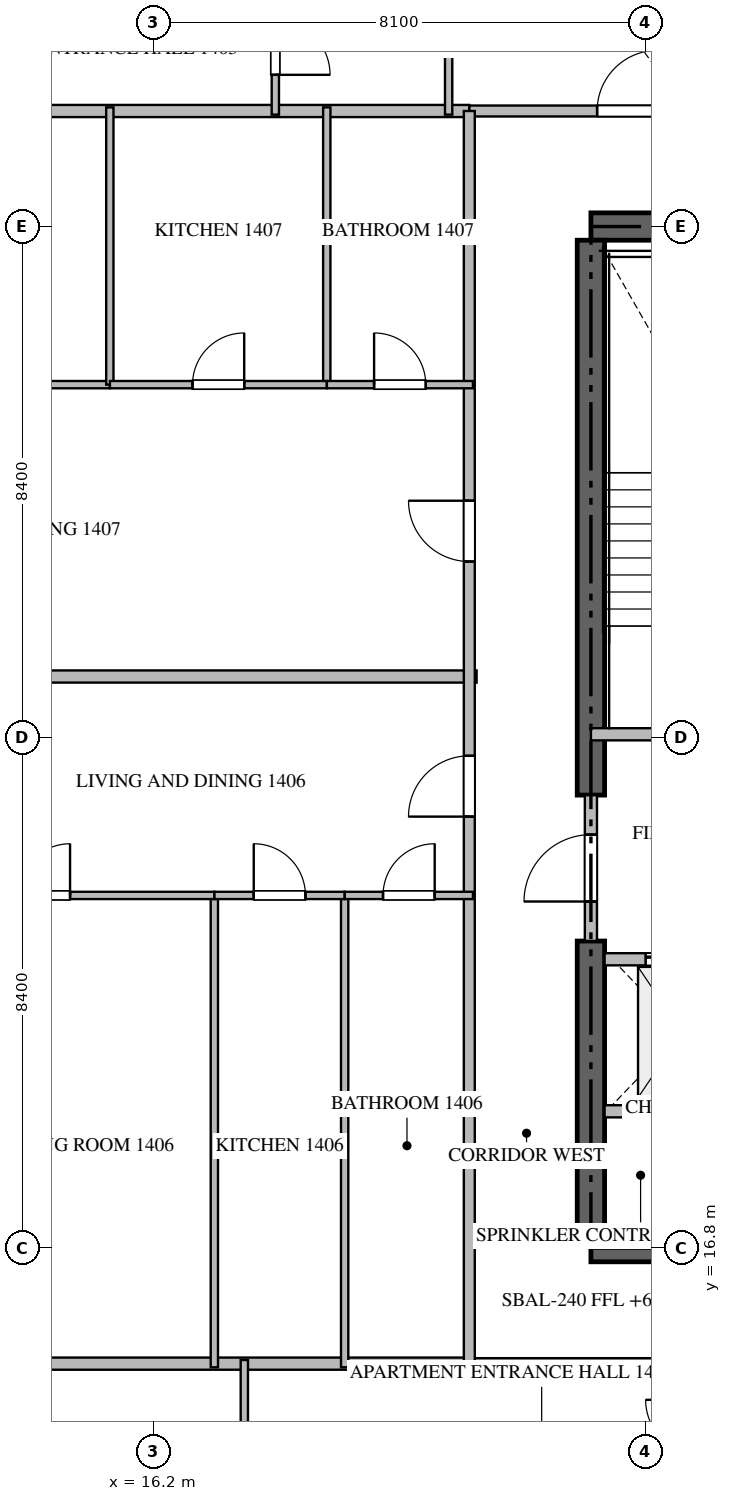
"""IFC4 building model, lengths in metres.
Left out: names, types, materials, properties, quantities, classifications, styles, units other than length and angle.
Written with IfcOpenShell. Run it as: python <this file> out.ifc"""

import sys

from ifc_helpers import new_model, si_unit, direction, frame, frame_2d, origin, place, context, subcontext, project, spatial, rectangle, extrude, source, transform, mapped, element, fill, save


model = new_model("IFC4")
c1 = context("Model", 3, precision=1e-05, world=origin(), true_north=direction((0.0, 1.0)))
c2 = subcontext(c1, "Body", "Model", "MODEL_VIEW")
j1 = project(units=[si_unit("LENGTHUNIT", "METRE"), si_unit("PLANEANGLEUNIT", "RADIAN")], contexts=[c1])
p1 = place(None, origin())
s1 = spatial("IfcSite", under=j1, at=p1, CompositionType="ELEMENT")
p2 = place(p1, origin())
s2 = spatial("IfcBuilding", under=s1, at=p2, CompositionType="ELEMENT")
p3 = place(p2, frame((0.0, 0.0, 60.45)))
s3 = spatial("IfcBuildingStorey", under=s2, at=p3, CompositionType="ELEMENT", Elevation=60.45)
for number, where, z_axis, x_axis in (
    (1, (23.4, 16.8, -0.26), (0.0, 0.0, 1.0), (1.0, 0.0, 0.0)),
    (2, (41.4, 33.6, -0.26), (0.0, 0.0, 1.0), (-1.0, 0.0, 0.0)),
):
    element("IfcWall", number, at=place(p3, frame(where, z_axis=z_axis, x_axis=x_axis)), inside=s3, PredefinedType="SHEAR", context=c2, shape_type="SweptSolid", body=[
        extrude(rectangle(XDim=18.0, YDim=0.45, at=frame_2d((9.0, 0.0))), origin(), (0.0, 0.0, 1.0), 3.748),
    ])
p4 = place(p3, frame((23.4, 17.025, -0.26), z_axis=(0.0, 0.0, 1.0), x_axis=(0.0, 1.0, 0.0)))
e3 = element("IfcWall", 3, at=p4, inside=s3, PredefinedType="SHEAR", context=c2, shape_type="SweptSolid", body=[
    extrude(rectangle(XDim=4.825, YDim=0.45, at=frame_2d((2.413, 0.0))), origin(), (0.0, 0.0, 1.0), 3.748),
])
p5 = place(p3, frame((23.4, 24.25, -0.26), z_axis=(0.0, 0.0, 1.0), x_axis=(0.0, 1.0, 0.0)))
e4 = element("IfcWall", 4, at=p5, inside=s3, PredefinedType="SHEAR", context=c2, shape_type="SweptSolid", body=[
    extrude(rectangle(XDim=9.125, YDim=0.45, at=frame_2d((4.562, 0.0))), origin(), (0.0, 0.0, 1.0), 3.748),
])
p6 = place(p3, frame((23.4, 25.25, 0.0), z_axis=(0.0, 0.0, 1.0), x_axis=(1.0, 0.0, 0.0)))
e5 = element("IfcWall", 5, at=p6, inside=s3, PredefinedType="STANDARD", context=c2, shape_type="SweptSolid", body=[
    extrude(rectangle(XDim=4.45, YDim=0.2, at=frame_2d((2.225, 0.0))), origin(), (0.0, 0.0, 1.0), 3.49),
])
p7 = place(p6, frame((1.65, 0.0, 0.0)))
e6 = element("IfcOpeningElement", 6, at=p7, cuts=e5, PredefinedType="OPENING", context=c2, shape_type="SweptSolid", body=[
    extrude(rectangle(XDim=1.1, YDim=2.15, at=frame_2d((0.55, 1.075))), frame((0.0, 0.11, 0.0), z_axis=(0.0, -1.0, 0.0), x_axis=(1.0, 0.0, 0.0)), (0.0, 0.0, 1.0), 0.22),
])
p8 = place(p3, frame((23.625, 21.55, 0.0), z_axis=(0.0, 0.0, 1.0), x_axis=(1.0, 0.0, 0.0)))
e7 = element("IfcWall", 7, at=p8, inside=s3, PredefinedType="STANDARD", context=c2, shape_type="SweptSolid", body=[
    extrude(rectangle(XDim=2.425, YDim=0.2, at=frame_2d((1.212, 0.0))), origin(), (0.0, 0.0, 1.0), 3.49),
])
p9 = place(p8, frame((0.675, 0.0, 0.0)))
e8 = element("IfcOpeningElement", 8, at=p9, cuts=e7, PredefinedType="OPENING", context=c2, shape_type="SweptSolid", body=[
    extrude(rectangle(XDim=1.2, YDim=2.2, at=frame_2d((0.6, 1.1))), frame((0.0, 0.11, 0.0), z_axis=(0.0, -1.0, 0.0), x_axis=(1.0, 0.0, 0.0)), (0.0, 0.0, 1.0), 0.22),
])
p10 = place(p3, frame((23.625, 19.05, 0.0), z_axis=(0.0, 0.0, 1.0), x_axis=(1.0, 0.0, 0.0)))
e9 = element("IfcWall", 9, at=p10, inside=s3, PredefinedType="STANDARD", context=c2, shape_type="SweptSolid", body=[
    extrude(rectangle(XDim=2.425, YDim=0.2, at=frame_2d((1.212, 0.0))), origin(), (0.0, 0.0, 1.0), 3.49),
])
p11 = place(p3, frame((23.4, 21.852, 0.0), z_axis=(0.0, 0.0, 1.0), x_axis=(0.0, 1.0, 0.0)))
e10 = element("IfcWall", 10, at=p11, inside=s3, PredefinedType="STANDARD", context=c2, shape_type="SweptSolid", body=[
    extrude(rectangle(XDim=2.396, YDim=0.2, at=frame_2d((1.198, 0.0))), origin(), (0.0, 0.0, 1.0), 3.49),
])
p12 = place(p11, frame((0.648, 0.0, 0.0)))
e11 = element("IfcOpeningElement", 11, at=p12, cuts=e10, PredefinedType="OPENING", context=c2, shape_type="SweptSolid", body=[
    extrude(rectangle(XDim=1.1, YDim=2.15, at=frame_2d((0.55, 1.075))), frame((0.0, 0.11, 0.0), z_axis=(0.0, -1.0, 0.0), x_axis=(1.0, 0.0, 0.0)), (0.0, 0.0, 1.0), 0.22),
])
p13 = place(p3, frame((6.082, 26.2, 0.0), z_axis=(0.0, 0.0, 1.0), x_axis=(1.0, 0.0, 0.0)))
e12 = element("IfcWall", 12, at=p13, inside=s3, PredefinedType="PARTITIONING", context=c2, shape_type="SweptSolid", body=[
    extrude(rectangle(XDim=15.438, YDim=0.2, at=frame_2d((7.719, 0.0))), origin(), (0.0, 0.0, 1.0), 3.49),
])
for number, where, z_axis, x_axis in (
    (13, (6.082, 14.9, 0.0), (0.0, 0.0, 1.0), (1.0, 0.0, 0.0)),
    (14, (6.082, 35.5, 0.0), (0.0, 0.0, 1.0), (1.0, 0.0, 0.0)),
):
    element("IfcWall", number, at=place(p3, frame(where, z_axis=z_axis, x_axis=x_axis)), inside=s3, PredefinedType="PARTITIONING", context=c2, shape_type="SweptSolid", body=[
        extrude(rectangle(XDim=15.318, YDim=0.2, at=frame_2d((7.659, 0.0))), origin(), (0.0, 0.0, 1.0), 3.49),
    ])
p14 = place(p3, frame((21.402, 14.9, 0.0), z_axis=(0.0, 0.0, 1.0), x_axis=(1.0, 0.0, 0.0)))
e15 = element("IfcWall", 15, at=p14, inside=s3, PredefinedType="PARTITIONING", context=c2, shape_type="SweptSolid", body=[
    extrude(rectangle(XDim=21.996, YDim=0.18, at=frame_2d((10.998, 0.0))), origin(), (0.0, 0.0, 1.0), 3.49),
])
p15 = place(p14, frame((9.742, 0.0, 0.0)))
e16 = element("IfcOpeningElement", 16, at=p15, cuts=e15, PredefinedType="OPENING", context=c2, shape_type="SweptSolid", body=[
    extrude(rectangle(XDim=1.0, YDim=2.15, at=frame_2d((0.5, 1.075))), frame((0.0, 0.1, 0.0), z_axis=(0.0, -1.0, 0.0), x_axis=(1.0, 0.0, 0.0)), (0.0, 0.0, 1.0), 0.2),
])
p16 = place(p14, frame((14.781, 0.0, 0.0)))
e17 = element("IfcOpeningElement", 17, at=p16, cuts=e15, PredefinedType="OPENING", context=c2, shape_type="SweptSolid", body=[
    extrude(rectangle(XDim=1.0, YDim=2.15, at=frame_2d((0.5, 1.075))), frame((0.0, 0.1, 0.0), z_axis=(0.0, -1.0, 0.0), x_axis=(1.0, 0.0, 0.0)), (0.0, 0.0, 1.0), 0.2),
])
p17 = place(p3, frame((21.402, 35.5, 0.0), z_axis=(0.0, 0.0, 1.0), x_axis=(1.0, 0.0, 0.0)))
e18 = element("IfcWall", 18, at=p17, inside=s3, PredefinedType="PARTITIONING", context=c2, shape_type="SweptSolid", body=[
    extrude(rectangle(XDim=21.996, YDim=0.18, at=frame_2d((10.998, 0.0))), origin(), (0.0, 0.0, 1.0), 3.49),
])
p18 = place(p17, frame((2.1, 0.0, 0.0)))
e19 = element("IfcOpeningElement", 19, at=p18, cuts=e18, PredefinedType="OPENING", context=c2, shape_type="SweptSolid", body=[
    extrude(rectangle(XDim=1.0, YDim=2.15, at=frame_2d((0.5, 1.075))), frame((0.0, 0.1, 0.0), z_axis=(0.0, -1.0, 0.0), x_axis=(1.0, 0.0, 0.0)), (0.0, 0.0, 1.0), 0.2),
])
p19 = place(p17, frame((5.942, 0.0, 0.0)))
e20 = element("IfcOpeningElement", 20, at=p19, cuts=e18, PredefinedType="OPENING", context=c2, shape_type="SweptSolid", body=[
    extrude(rectangle(XDim=1.0, YDim=2.15, at=frame_2d((0.5, 1.075))), frame((0.0, 0.1, 0.0), z_axis=(0.0, -1.0, 0.0), x_axis=(1.0, 0.0, 0.0)), (0.0, 0.0, 1.0), 0.2),
])
p20 = place(p17, frame((16.272, 0.0, 0.0)))
e21 = element("IfcOpeningElement", 21, at=p20, cuts=e18, PredefinedType="OPENING", context=c2, shape_type="SweptSolid", body=[
    extrude(rectangle(XDim=1.0, YDim=2.15, at=frame_2d((0.5, 1.075))), frame((0.0, 0.1, 0.0), z_axis=(0.0, -1.0, 0.0), x_axis=(1.0, 0.0, 0.0)), (0.0, 0.0, 1.0), 0.2),
])
p21 = place(p3, frame((21.4, 14.9, 0.0), z_axis=(0.0, 0.0, 1.0), x_axis=(0.0, 1.0, 0.0)))
e22 = element("IfcWall", 22, at=p21, inside=s3, PredefinedType="PARTITIONING", context=c2, shape_type="SweptSolid", body=[
    extrude(rectangle(XDim=20.6, YDim=0.18, at=frame_2d((10.3, 0.0))), origin(), (0.0, 0.0, 1.0), 3.49),
])
p22 = place(p21, frame((8.996, 0.0, 0.0)))
e23 = element("IfcOpeningElement", 23, at=p22, cuts=e22, PredefinedType="OPENING", context=c2, shape_type="SweptSolid", body=[
    extrude(rectangle(XDim=1.0, YDim=2.15, at=frame_2d((0.5, 1.075))), frame((0.0, 0.1, 0.0), z_axis=(0.0, -1.0, 0.0), x_axis=(1.0, 0.0, 0.0)), (0.0, 0.0, 1.0), 0.2),
])
p23 = place(p21, frame((13.191, 0.0, 0.0)))
e24 = element("IfcOpeningElement", 24, at=p23, cuts=e22, PredefinedType="OPENING", context=c2, shape_type="SweptSolid", body=[
    extrude(rectangle(XDim=1.0, YDim=2.15, at=frame_2d((0.5, 1.075))), frame((0.0, 0.1, 0.0), z_axis=(0.0, -1.0, 0.0), x_axis=(1.0, 0.0, 0.0)), (0.0, 0.0, 1.0), 0.2),
])
p24 = place(p3, frame((17.7, 12.752, 0.0), z_axis=(0.0, 0.0, 1.0), x_axis=(0.0, 1.0, 0.0)))
e25 = element("IfcWall", 25, at=p24, inside=s3, PredefinedType="PARTITIONING", context=c2, shape_type="SweptSolid", body=[
    extrude(rectangle(XDim=2.208, YDim=0.12, at=frame_2d((1.104, 0.0))), origin(), (0.0, 0.0, 1.0), 3.49),
])
p25 = place(p3, frame((21.06, 38.25, 0.0), z_axis=(0.0, 0.0, 1.0), x_axis=(0.0, -1.0, 0.0)))
e26 = element("IfcWall", 26, at=p25, inside=s3, PredefinedType="PARTITIONING", context=c2, shape_type="SweptSolid", body=[
    extrude(rectangle(XDim=2.81, YDim=0.12, at=frame_2d((1.405, 0.0))), origin(), (0.0, 0.0, 1.0), 3.49),
])
p26 = place(p3, frame((18.21, 37.65, 0.0), z_axis=(0.0, 0.0, 1.0), x_axis=(0.0, -1.0, 0.0)))
e27 = element("IfcWall", 27, at=p26, inside=s3, PredefinedType="PARTITIONING", context=c2, shape_type="SweptSolid", body=[
    extrude(rectangle(XDim=2.21, YDim=0.12, at=frame_2d((1.105, 0.0))), origin(), (0.0, 0.0, 1.0), 3.49),
])
p27 = place(p26, frame((0.655, 0.0, 0.0)))
e28 = element("IfcOpeningElement", 28, at=p27, cuts=e27, PredefinedType="OPENING", context=c2, shape_type="SweptSolid", body=[
    extrude(rectangle(XDim=0.9, YDim=2.1, at=frame_2d((0.45, 1.05))), frame((0.0, 0.07, 0.0), z_axis=(0.0, -1.0, 0.0), x_axis=(1.0, 0.0, 0.0)), (0.0, 0.0, 1.0), 0.14),
])
for number, where, z_axis, x_axis in (
    (29, (17.207, 14.84, 0.0), (0.0, 0.0, 1.0), (0.0, 1.0, 0.0)),
    (30, (19.35, 14.84, 0.0), (0.0, 0.0, 1.0), (0.0, 1.0, 0.0)),
):
    element("IfcWall", number, at=place(p3, frame(where, z_axis=z_axis, x_axis=x_axis)), inside=s3, PredefinedType="PARTITIONING", context=c2, shape_type="SweptSolid", body=[
        extrude(rectangle(XDim=7.76, YDim=0.12, at=frame_2d((3.88, 0.0))), origin(), (0.0, 0.0, 1.0), 3.49),
    ])
p28 = place(p3, frame((11.611, 22.6, 0.0), z_axis=(0.0, 0.0, 1.0), x_axis=(1.0, 0.0, 0.0)))
e31 = element("IfcWall", 31, at=p28, inside=s3, PredefinedType="PARTITIONING", context=c2, shape_type="SweptSolid", body=[
    extrude(rectangle(XDim=5.596, YDim=0.12, at=frame_2d((2.798, 0.0))), origin(), (0.0, 0.0, 1.0), 3.49),
])
p29 = place(p28, frame((2.373, 0.0, 0.0)))
e32 = element("IfcOpeningElement", 32, at=p29, cuts=e31, PredefinedType="OPENING", context=c2, shape_type="SweptSolid", body=[
    extrude(rectangle(XDim=0.85, YDim=2.1, at=frame_2d((0.425, 1.05))), frame((0.0, 0.07, 0.0), z_axis=(0.0, -1.0, 0.0), x_axis=(1.0, 0.0, 0.0)), (0.0, 0.0, 1.0), 0.14),
])
p30 = place(p3, frame((17.209, 22.6, 0.0), z_axis=(0.0, 0.0, 1.0), x_axis=(1.0, 0.0, 0.0)))
e33 = element("IfcWall", 33, at=p30, inside=s3, PredefinedType="PARTITIONING", context=c2, shape_type="SweptSolid", body=[
    extrude(rectangle(XDim=2.141, YDim=0.12, at=frame_2d((1.071, 0.0))), origin(), (0.0, 0.0, 1.0), 3.49),
])
p31 = place(p30, frame((0.646, 0.0, 0.0)))
e34 = element("IfcOpeningElement", 34, at=p31, cuts=e33, PredefinedType="OPENING", context=c2, shape_type="SweptSolid", body=[
    extrude(rectangle(XDim=0.85, YDim=2.1, at=frame_2d((0.425, 1.05))), frame((0.0, 0.07, 0.0), z_axis=(0.0, -1.0, 0.0), x_axis=(1.0, 0.0, 0.0)), (0.0, 0.0, 1.0), 0.14),
])
p32 = place(p3, frame((19.352, 22.6, 0.0), z_axis=(0.0, 0.0, 1.0), x_axis=(1.0, 0.0, 0.0)))
e35 = element("IfcWall", 35, at=p32, inside=s3, PredefinedType="PARTITIONING", context=c2, shape_type="SweptSolid", body=[
    extrude(rectangle(XDim=2.108, YDim=0.12, at=frame_2d((1.054, 0.0))), origin(), (0.0, 0.0, 1.0), 3.49),
])
p33 = place(p32, frame((0.629, 0.0, 0.0)))
e36 = element("IfcOpeningElement", 36, at=p33, cuts=e35, PredefinedType="OPENING", context=c2, shape_type="SweptSolid", body=[
    extrude(rectangle(XDim=0.85, YDim=2.1, at=frame_2d((0.425, 1.05))), frame((0.0, 0.07, 0.0), z_axis=(0.0, -1.0, 0.0), x_axis=(1.0, 0.0, 0.0)), (0.0, 0.0, 1.0), 0.14),
])
p34 = place(p3, frame((6.095, 31.0, 0.0), z_axis=(0.0, 0.0, 1.0), x_axis=(1.0, 0.0, 0.0)))
e37 = element("IfcWall", 37, at=p34, inside=s3, PredefinedType="PARTITIONING", context=c2, shape_type="SweptSolid", body=[
    extrude(rectangle(XDim=9.393, YDim=0.12, at=frame_2d((4.697, 0.0))), origin(), (0.0, 0.0, 1.0), 3.49),
])
p35 = place(p34, frame((4.671, 0.0, 0.0)))
e38 = element("IfcOpeningElement", 38, at=p35, cuts=e37, PredefinedType="OPENING", context=c2, shape_type="SweptSolid", body=[
    extrude(rectangle(XDim=0.9, YDim=2.1, at=frame_2d((0.45, 1.05))), frame((0.0, 0.07, 0.0), z_axis=(0.0, -1.0, 0.0), x_axis=(1.0, 0.0, 0.0)), (0.0, 0.0, 1.0), 0.14),
])
p36 = place(p3, frame((15.488, 31.0, 0.0), z_axis=(0.0, 0.0, 1.0), x_axis=(0.0, 1.0, 0.0)))
e39 = element("IfcWall", 39, at=p36, inside=s3, PredefinedType="PARTITIONING", context=c2, shape_type="SweptSolid", body=[
    extrude(rectangle(XDim=4.56, YDim=0.12, at=frame_2d((2.28, 0.0))), origin(), (0.0, 0.0, 1.0), 2.922),
])
p37 = place(p3, frame((19.056, 31.0, 0.0), z_axis=(0.0, 0.0, 1.0), x_axis=(0.0, 1.0, 0.0)))
e40 = element("IfcWall", 40, at=p37, inside=s3, PredefinedType="PARTITIONING", context=c2, shape_type="SweptSolid", body=[
    extrude(rectangle(XDim=4.56, YDim=0.12, at=frame_2d((2.28, 0.0))), origin(), (0.0, 0.0, 1.0), 3.49),
])
p38 = place(p3, frame((15.49, 31.0, 0.0), z_axis=(0.0, 0.0, 1.0), x_axis=(1.0, 0.0, 0.0)))
e41 = element("IfcWall", 41, at=p38, inside=s3, PredefinedType="PARTITIONING", context=c2, shape_type="SweptSolid", body=[
    extrude(rectangle(XDim=3.566, YDim=0.12, at=frame_2d((1.783, 0.0))), origin(), (0.0, 0.0, 1.0), 3.49),
])
p39 = place(p38, frame((1.358, 0.0, 0.0)))
e42 = element("IfcOpeningElement", 42, at=p39, cuts=e41, PredefinedType="OPENING", context=c2, shape_type="SweptSolid", body=[
    extrude(rectangle(XDim=0.85, YDim=2.1, at=frame_2d((0.425, 1.05))), frame((0.0, 0.07, 0.0), z_axis=(0.0, -1.0, 0.0), x_axis=(1.0, 0.0, 0.0)), (0.0, 0.0, 1.0), 0.14),
])
p40 = place(p3, frame((19.058, 31.0, 0.0), z_axis=(0.0, 0.0, 1.0), x_axis=(1.0, 0.0, 0.0)))
e43 = element("IfcWall", 43, at=p40, inside=s3, PredefinedType="PARTITIONING", context=c2, shape_type="SweptSolid", body=[
    extrude(rectangle(XDim=2.402, YDim=0.12, at=frame_2d((1.201, 0.0))), origin(), (0.0, 0.0, 1.0), 3.49),
])
p41 = place(p40, frame((0.776, 0.0, 0.0)))
e44 = element("IfcOpeningElement", 44, at=p41, cuts=e43, PredefinedType="OPENING", context=c2, shape_type="SweptSolid", body=[
    extrude(rectangle(XDim=0.85, YDim=2.1, at=frame_2d((0.425, 1.05))), frame((0.0, 0.07, 0.0), z_axis=(0.0, -1.0, 0.0), x_axis=(1.0, 0.0, 0.0)), (0.0, 0.0, 1.0), 0.14),
])
m1 = source(origin(), c2, "Body", "SweptSolid", [
    extrude(rectangle(XDim=1.2, YDim=2.2, at=frame_2d((0.6, 1.1))), frame((0.0, 0.025, 0.0), z_axis=(0.0, -1.0, 0.0), x_axis=(1.0, 0.0, 0.0)), (0.0, 0.0, 1.0), 0.05),
])
p42 = place(p9, origin())
e45 = element("IfcDoor", 45, at=p42, inside=s3, OperationType="DOUBLE_DOOR_SLIDING", PredefinedType="DOOR", context=c2, shape_type="MappedRepresentation", body=[
    mapped(m1, transform((0.0, 0.0, 0.0), scale=1.0)),
])
fill(e8, e45)
m2 = source(origin(), c2, "Body", "SweptSolid", [
    extrude(rectangle(XDim=1.1, YDim=2.15, at=frame_2d((0.55, 1.075))), frame((0.0, 0.025, 0.0), z_axis=(0.0, -1.0, 0.0), x_axis=(1.0, 0.0, 0.0)), (0.0, 0.0, 1.0), 0.05),
])
p43 = place(p12, origin())
e46 = element("IfcDoor", 46, at=p43, inside=s3, OperationType="SINGLE_SWING_LEFT", PredefinedType="DOOR", context=c2, shape_type="MappedRepresentation", body=[
    mapped(m2, transform((0.0, 0.0, 0.0), scale=1.0)),
])
fill(e11, e46)
m3 = source(origin(), c2, "Body", "SweptSolid", [
    extrude(rectangle(XDim=1.0, YDim=2.15, at=frame_2d((0.5, 1.075))), frame((0.0, 0.025, 0.0), z_axis=(0.0, -1.0, 0.0), x_axis=(1.0, 0.0, 0.0)), (0.0, 0.0, 1.0), 0.05),
])
p44 = place(p18, origin())
e47 = element("IfcDoor", 47, at=p44, inside=s3, OperationType="SINGLE_SWING_RIGHT", PredefinedType="DOOR", context=c2, shape_type="MappedRepresentation", body=[
    mapped(m3, transform((0.0, 0.0, 0.0), scale=1.0)),
])
fill(e19, e47)
p45 = place(p22, origin())
e48 = element("IfcDoor", 48, at=p45, inside=s3, OperationType="SINGLE_SWING_LEFT", PredefinedType="DOOR", context=c2, shape_type="MappedRepresentation", body=[
    mapped(m3, transform((0.0, 0.0, 0.0), scale=1.0)),
])
fill(e23, e48)
p46 = place(p23, origin())
e49 = element("IfcDoor", 49, at=p46, inside=s3, OperationType="SINGLE_SWING_RIGHT", PredefinedType="DOOR", context=c2, shape_type="MappedRepresentation", body=[
    mapped(m3, transform((0.0, 0.0, 0.0), scale=1.0)),
])
fill(e24, e49)
m4 = source(origin(), c2, "Body", "SweptSolid", [
    extrude(rectangle(XDim=0.9, YDim=2.1, at=frame_2d((0.45, 1.05))), frame((0.0, 0.025, 0.0), z_axis=(0.0, -1.0, 0.0), x_axis=(1.0, 0.0, 0.0)), (0.0, 0.0, 1.0), 0.05),
])
p47 = place(p27, origin())
e50 = element("IfcDoor", 50, at=p47, inside=s3, OperationType="SINGLE_SWING_RIGHT", PredefinedType="DOOR", context=c2, shape_type="MappedRepresentation", body=[
    mapped(m4, transform((0.0, 0.0, 0.0), scale=1.0)),
])
fill(e28, e50)
m5 = source(origin(), c2, "Body", "SweptSolid", [
    extrude(rectangle(XDim=0.85, YDim=2.1, at=frame_2d((0.425, 1.05))), frame((0.0, 0.025, 0.0), z_axis=(0.0, -1.0, 0.0), x_axis=(1.0, 0.0, 0.0)), (0.0, 0.0, 1.0), 0.05),
])
p48 = place(p29, origin())
e51 = element("IfcDoor", 51, at=p48, inside=s3, OperationType="SINGLE_SWING_RIGHT", PredefinedType="DOOR", context=c2, shape_type="MappedRepresentation", body=[
    mapped(m5, transform((0.0, 0.0, 0.0), scale=1.0)),
])
fill(e32, e51)
p49 = place(p31, origin())
e52 = element("IfcDoor", 52, at=p49, inside=s3, OperationType="SINGLE_SWING_LEFT", PredefinedType="DOOR", context=c2, shape_type="MappedRepresentation", body=[
    mapped(m5, transform((0.0, 0.0, 0.0), scale=1.0)),
])
fill(e34, e52)
p50 = place(p33, origin())
e53 = element("IfcDoor", 53, at=p50, inside=s3, OperationType="SINGLE_SWING_RIGHT", PredefinedType="DOOR", context=c2, shape_type="MappedRepresentation", body=[
    mapped(m5, transform((0.0, 0.0, 0.0), scale=1.0)),
])
fill(e36, e53)
p51 = place(p39, origin())
e54 = element("IfcDoor", 54, at=p51, inside=s3, OperationType="SINGLE_SWING_RIGHT", PredefinedType="DOOR", context=c2, shape_type="MappedRepresentation", body=[
    mapped(m5, transform((0.0, 0.0, 0.0), scale=1.0)),
])
fill(e42, e54)
p52 = place(p41, origin())
e55 = element("IfcDoor", 55, at=p52, inside=s3, OperationType="SINGLE_SWING_LEFT", PredefinedType="DOOR", context=c2, shape_type="MappedRepresentation", body=[
    mapped(m5, transform((0.0, 0.0, 0.0), scale=1.0)),
])
fill(e44, e55)
save(model, sys.argv[1])
